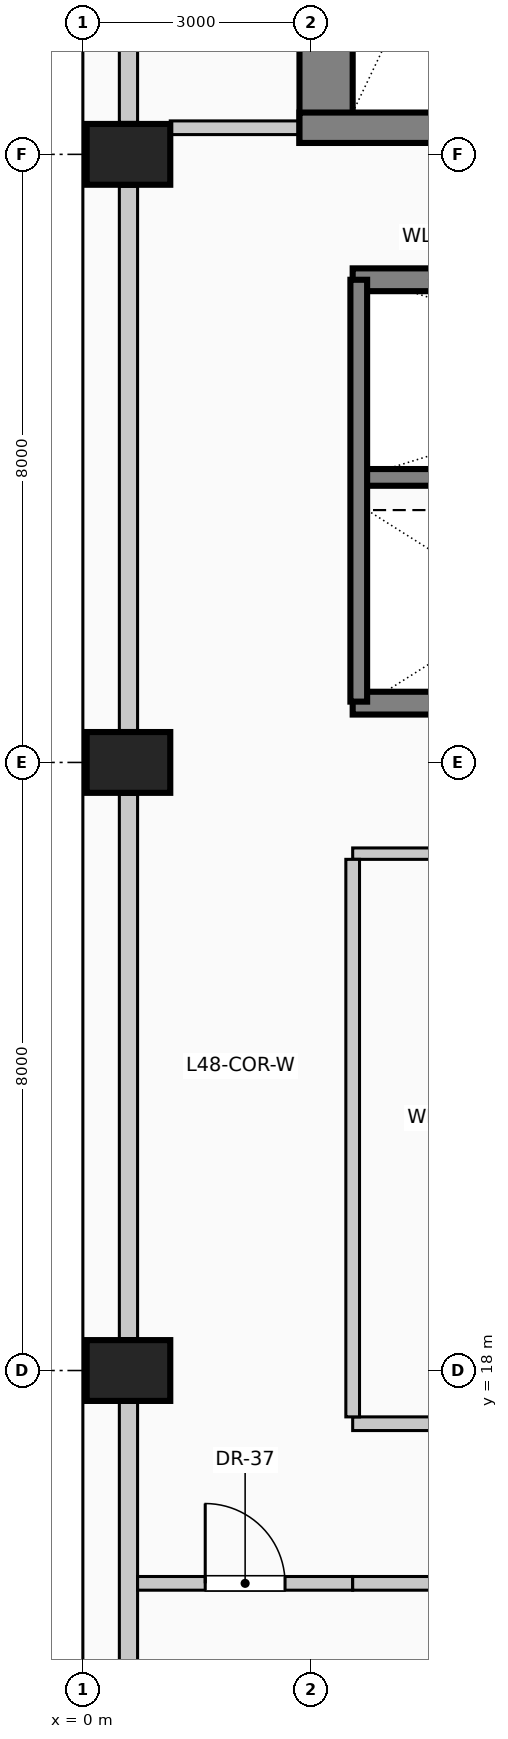
"""IFC4 building model, lengths in metres.
Left out: names, types, materials, properties, quantities, classifications, styles, units other than length and angle.
Written with IfcOpenShell. Run it as: python <this file> out.ifc"""

import sys

from ifc_helpers import new_model, si_unit, direction, frame, frame_2d, origin, origin_2d, place, context, subcontext, project, spatial, rectangle, extrude, element, fill, save


model = new_model("IFC4")
c1 = context("Model", 3, precision=1e-05, world=origin(), true_north=direction((0.0, 1.0)))
c2 = subcontext(c1, "Body", "Model", "MODEL_VIEW")
j1 = project(units=[si_unit("LENGTHUNIT", "METRE"), si_unit("PLANEANGLEUNIT", "RADIAN")], contexts=[c1])
p1 = place(None, origin())
s1 = spatial("IfcSite", under=j1, at=p1, CompositionType="ELEMENT")
p2 = place(p1, origin())
s2 = spatial("IfcBuilding", under=s1, at=p2, CompositionType="ELEMENT")
p3 = place(p2, frame((0.0, 0.0, 198.6)))
s3 = spatial("IfcBuildingStorey", under=s2, at=p3, CompositionType="ELEMENT", Elevation=198.6)
p4 = place(p3, frame((3.2, 34.15, 0.0), z_axis=(0.0, 0.0, 1.0), x_axis=(0.0, 1.0, 0.0)))
e1 = element("IfcWall", 1, at=p4, inside=s3, PredefinedType="SHEAR", context=c2, shape_type="SweptSolid", body=[
    extrude(rectangle(XDim=8.98, YDim=0.7, at=frame_2d((4.49, 0.0))), origin(), (0.0, 0.0, 1.0), 4.0),
])
p5 = place(p3, frame((2.85, 34.35, 0.0), z_axis=(0.0, 0.0, 1.0), x_axis=(1.0, 0.0, 0.0)))
e2 = element("IfcWall", 2, at=p5, inside=s3, PredefinedType="SHEAR", context=c2, shape_type="SweptSolid", body=[
    extrude(rectangle(XDim=4.86, YDim=0.4, at=frame_2d((2.43, 0.0))), origin(), (0.0, 0.0, 1.0), 4.0),
])
p6 = place(p5, frame((2.4, 0.0, 0.0)))
e3 = element("IfcOpeningElement", 3, at=p6, cuts=e2, PredefinedType="OPENING", context=c2, shape_type="SweptSolid", body=[
    extrude(rectangle(XDim=1.15, YDim=2.2, at=frame_2d((0.575, 1.1))), frame((0.0, 0.21, 0.0), z_axis=(0.0, -1.0, 0.0), x_axis=(1.0, 0.0, 0.0)), (0.0, 0.0, 1.0), 0.42),
])
for number, where, z_axis, x_axis in (
    (4, (0.6, 18.0, 0.0), (0.0, 0.0, 1.0), (0.0, 1.0, 0.0)),
    (5, (0.6, 26.0, 0.0), (0.0, 0.0, 1.0), (0.0, 1.0, 0.0)),
    (6, (0.6, 34.0, 0.0), (0.0, 0.0, 1.0), (0.0, 1.0, 0.0)),
):
    element("IfcColumn", number, at=place(p3, frame(where, z_axis=z_axis, x_axis=x_axis)), inside=s3, PredefinedType="COLUMN", context=c2, shape_type="SweptSolid", body=[
        extrude(rectangle(XDim=0.8, YDim=1.1, at=origin_2d()), origin(), (0.0, 0.0, 1.0), 4.0),
    ])
for number, where, z_axis, x_axis in (
    (7, (0.6, 10.42, 0.0), (0.0, 0.0, 1.0), (0.0, 1.0, 0.0)),
    (8, (0.6, 18.42, 0.0), (0.0, 0.0, 1.0), (0.0, 1.0, 0.0)),
    (9, (0.6, 26.42, 0.0), (0.0, 0.0, 1.0), (0.0, 1.0, 0.0)),
):
    element("IfcWall", number, at=place(p3, frame(where, z_axis=z_axis, x_axis=x_axis)), inside=s3, PredefinedType="SOLIDWALL", context=c2, shape_type="SweptSolid", body=[
        extrude(rectangle(XDim=7.16, YDim=0.24, at=frame_2d((3.58, 0.0))), origin(), (0.0, 0.0, 1.0), 3.0),
    ])
p7 = place(p3, frame((0.6, 34.42, 0.0), z_axis=(0.0, 0.0, 1.0), x_axis=(0.0, 1.0, 0.0)))
e10 = element("IfcWall", 10, at=p7, inside=s3, PredefinedType="SOLIDWALL", context=c2, shape_type="SweptSolid", body=[
    extrude(rectangle(XDim=7.56, YDim=0.24, at=frame_2d((3.78, 0.0))), origin(), (0.0, 0.0, 1.0), 3.0),
])
for number, where, z_axis, x_axis in (
    (11, (3.55, 32.35, 0.0), (0.0, 0.0, 1.0), (1.0, 0.0, 0.0)),
    (12, (5.65, 26.78, 0.0), (0.0, 0.0, 1.0), (-1.0, 0.0, 0.0)),
):
    element("IfcWall", number, at=place(p3, frame(where, z_axis=z_axis, x_axis=x_axis)), inside=s3, PredefinedType="SOLIDWALL", context=c2, shape_type="SweptSolid", body=[
        extrude(rectangle(XDim=2.1, YDim=0.3, at=frame_2d((1.05, 0.0))), origin(), (0.0, 0.0, 1.0), 4.0),
    ])
p8 = place(p3, frame((3.55, 29.75, 0.0), z_axis=(0.0, 0.0, 1.0), x_axis=(1.0, 0.0, 0.0)))
e13 = element("IfcWall", 13, at=p8, inside=s3, PredefinedType="SOLIDWALL", context=c2, shape_type="SweptSolid", body=[
    extrude(rectangle(XDim=8.65, YDim=0.22, at=frame_2d((4.325, 0.0))), origin(), (0.0, 0.0, 1.0), 4.0),
])
p9 = place(p3, frame((3.63, 26.8, 0.0), z_axis=(0.0, 0.0, 1.0), x_axis=(0.0, 1.0, 0.0)))
e14 = element("IfcWall", 14, at=p9, inside=s3, PredefinedType="SOLIDWALL", context=c2, shape_type="SweptSolid", body=[
    extrude(rectangle(XDim=5.55, YDim=0.22, at=frame_2d((2.775, 0.0))), origin(), (0.0, 0.0, 1.0), 4.0),
])
p10 = place(p3, frame((0.72, 15.2, 0.0), z_axis=(0.0, 0.0, 1.0), x_axis=(1.0, 0.0, 0.0)))
e15 = element("IfcWall", 15, at=p10, inside=s3, PredefinedType="PARTITIONING", context=c2, shape_type="SweptSolid", body=[
    extrude(rectangle(XDim=2.83, YDim=0.18, at=frame_2d((1.415, 0.0))), origin(), (0.0, 0.0, 1.0), 3.75),
])
p11 = place(p10, frame((0.89, 0.0, 0.0)))
e16 = element("IfcOpeningElement", 16, at=p11, cuts=e15, PredefinedType="OPENING", context=c2, shape_type="SweptSolid", body=[
    extrude(rectangle(XDim=1.05, YDim=2.15, at=frame_2d((0.525, 1.075))), frame((0.0, 0.1, 0.0), z_axis=(0.0, -1.0, 0.0), x_axis=(1.0, 0.0, 0.0)), (0.0, 0.0, 1.0), 0.2),
])
p12 = place(p3, frame((3.55, 15.2, 0.0), z_axis=(0.0, 0.0, 1.0), x_axis=(1.0, 0.0, 0.0)))
e17 = element("IfcWall", 17, at=p12, inside=s3, PredefinedType="PARTITIONING", context=c2, shape_type="SweptSolid", body=[
    extrude(rectangle(XDim=4.65, YDim=0.18, at=frame_2d((2.325, 0.0))), origin(), (0.0, 0.0, 1.0), 3.75),
])
p13 = place(p3, frame((3.55, 17.3, 0.0), z_axis=(0.0, 0.0, 1.0), x_axis=(1.0, 0.0, 0.0)))
e18 = element("IfcWall", 18, at=p13, inside=s3, PredefinedType="PARTITIONING", context=c2, shape_type="SweptSolid", body=[
    extrude(rectangle(XDim=6.25, YDim=0.18, at=frame_2d((3.125, 0.0))), origin(), (0.0, 0.0, 1.0), 3.75),
])
p14 = place(p13, frame((2.6, 0.0, 0.0)))
e19 = element("IfcOpeningElement", 19, at=p14, cuts=e18, PredefinedType="OPENING", context=c2, shape_type="SweptSolid", body=[
    extrude(rectangle(XDim=1.05, YDim=2.15, at=frame_2d((0.525, 1.075))), frame((0.0, 0.1, 0.0), z_axis=(0.0, -1.0, 0.0), x_axis=(1.0, 0.0, 0.0)), (0.0, 0.0, 1.0), 0.2),
])
p15 = place(p3, frame((3.55, 24.8, 0.0), z_axis=(0.0, 0.0, 1.0), x_axis=(1.0, 0.0, 0.0)))
e20 = element("IfcWall", 20, at=p15, inside=s3, PredefinedType="PARTITIONING", context=c2, shape_type="SweptSolid", body=[
    extrude(rectangle(XDim=6.25, YDim=0.15, at=frame_2d((3.125, 0.0))), origin(), (0.0, 0.0, 1.0), 3.75),
])
p16 = place(p3, frame((1.15, 34.35, 0.0), z_axis=(0.0, 0.0, 1.0), x_axis=(1.0, 0.0, 0.0)))
e21 = element("IfcWall", 21, at=p16, inside=s3, PredefinedType="PARTITIONING", context=c2, shape_type="SweptSolid", body=[
    extrude(rectangle(XDim=1.7, YDim=0.18, at=frame_2d((0.85, 0.0))), origin(), (0.0, 0.0, 1.0), 3.75),
])
p17 = place(p3, frame((3.55, 17.39, 0.0), z_axis=(0.0, 0.0, 1.0), x_axis=(0.0, 1.0, 0.0)))
e22 = element("IfcWall", 22, at=p17, inside=s3, PredefinedType="PARTITIONING", context=c2, shape_type="SweptSolid", body=[
    extrude(rectangle(XDim=7.335, YDim=0.18, at=frame_2d((3.667, 0.0))), origin(), (0.0, 0.0, 1.0), 3.75),
])
p18 = place(p11, origin())
e23 = element("IfcDoor", 23, at=p18, inside=s3, OperationType="SINGLE_SWING_LEFT", PredefinedType="DOOR", context=c2, shape_type="SweptSolid", body=[
    extrude(rectangle(XDim=1.05, YDim=2.15, at=frame_2d((0.525, 1.075))), frame((0.0, 0.025, 0.0), z_axis=(0.0, -1.0, 0.0), x_axis=(1.0, 0.0, 0.0)), (0.0, 0.0, 1.0), 0.05),
])
fill(e16, e23)
save(model, sys.argv[1])
